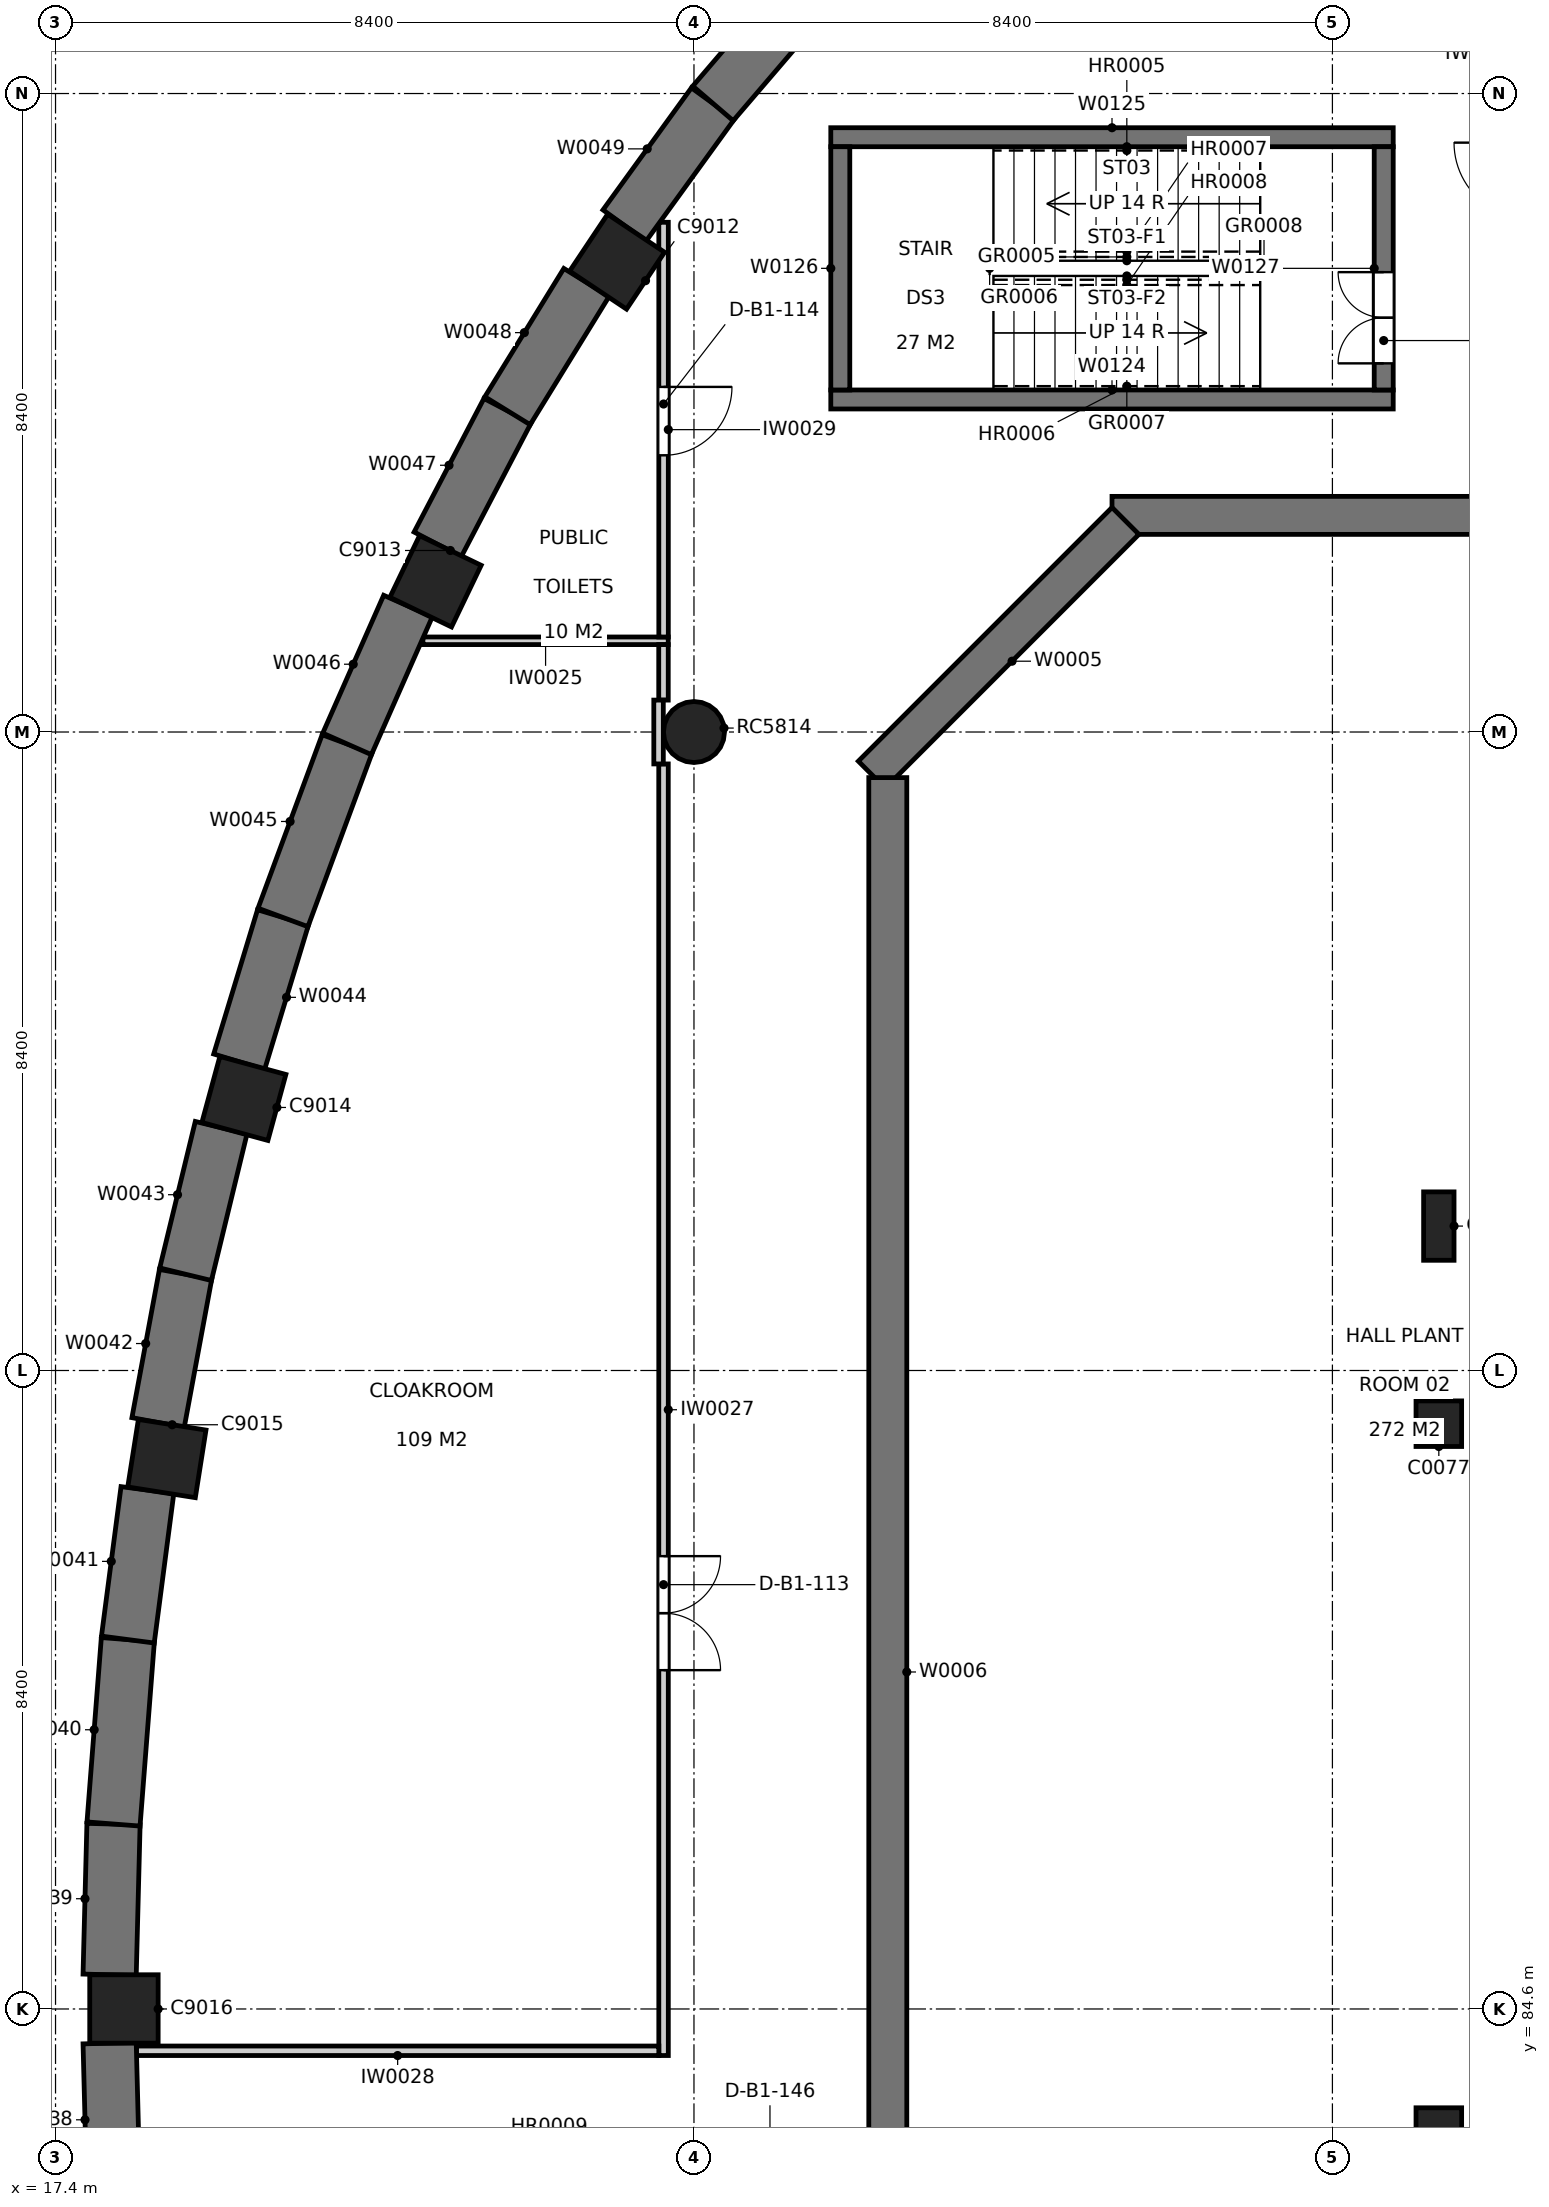
"""IFC4 building model, lengths in metres.
Left out: names, types, materials, properties, quantities, classifications, styles, units other than length and angle.
Written with IfcOpenShell. Run it as: python <this file> out.ifc"""

import sys

from ifc_helpers import new_model, si_unit, direction, frame, frame_2d, origin, origin_2d, place, context, subcontext, project, spatial, rectangle, circle, extrude, element, fill, save


model = new_model("IFC4")
c1 = context("Model", 3, precision=1e-05, world=origin(), true_north=direction((0.0, 1.0)))
c2 = subcontext(c1, "Body", "Model", "MODEL_VIEW")
j1 = project(units=[si_unit("LENGTHUNIT", "METRE"), si_unit("PLANEANGLEUNIT", "RADIAN")], contexts=[c1])
p1 = place(None, origin())
s1 = spatial("IfcSite", under=j1, at=p1, CompositionType="ELEMENT")
p2 = place(p1, origin())
s2 = spatial("IfcBuilding", under=s1, at=p2, CompositionType="ELEMENT")
p3 = place(p2, frame((0.0, 0.0, -5.0)))
s3 = spatial("IfcBuildingStorey", under=s2, at=p3, CompositionType="ELEMENT", Elevation=-5.0)
for number, where, z_axis, x_axis in (
    (1, (24.788, 107.588, -0.5), (0.0, 0.0, 1.0), (0.555, 0.832, 0.0)),
    (2, (22.4, 103.383, -0.5), (0.0, 0.0, 1.0), (0.433, 0.901, 0.0)),
    (3, (19.878, 96.579, -0.5), (0.0, 0.0, 1.0), (0.263, 0.965, 0.0)),
    (4, (18.865, 91.842, -0.5), (0.0, 0.0, 1.0), (0.156, 0.988, 0.0)),
    (5, (18.3, 84.6, -0.5), (0.0, 0.0, 1.0), (2.07e-06, 1.0, 0.0)),
):
    element("IfcColumn", number, at=place(p3, frame(where, z_axis=z_axis, x_axis=x_axis)), inside=s3, PredefinedType="COLUMN", context=c2, shape_type="SweptSolid", body=[
        extrude(rectangle(XDim=0.9, YDim=0.9, at=origin_2d()), origin(), (0.0, 0.0, 1.0), 5.5),
    ])
p4 = place(p3, frame((25.8, 101.4, -0.5), z_axis=(0.0, 0.0, 1.0), x_axis=(1.0, 0.0, 0.0)))
e6 = element("IfcColumn", 6, at=p4, inside=s3, PredefinedType="COLUMN", context=c2, shape_type="SweptSolid", body=[
    extrude(circle(Radius=0.4, at=origin_2d()), origin(), (0.0, 0.0, 1.0), 5.5),
])
for number, where, z_axis, x_axis in (
    (7, (35.6, 83.0, -0.5), (0.0, 0.0, 1.0), (1.0, 0.0, 0.0)),
    (8, (35.6, 92.3, -0.5), (0.0, 0.0, 1.0), (1.0, 0.0, 0.0)),
):
    element("IfcColumn", number, at=place(p3, frame(where, z_axis=z_axis, x_axis=x_axis)), inside=s3, PredefinedType="COLUMN", context=c2, shape_type="SweptSolid", body=[
        extrude(rectangle(XDim=0.6, YDim=0.6, at=origin_2d()), origin(), (0.0, 0.0, 1.0), 5.5),
    ])
p5 = place(p3, frame((35.6, 94.9, -0.5), z_axis=(0.0, 0.0, 1.0), x_axis=(1.0, 0.0, 0.0)))
e9 = element("IfcColumn", 9, at=p5, inside=s3, PredefinedType="COLUMN", context=c2, shape_type="SweptSolid", body=[
    extrude(rectangle(XDim=0.4, YDim=0.9, at=origin_2d()), origin(), (0.0, 0.0, 1.0), 5.5),
])
p6 = place(p3, frame((53.9, 104.25, 0.0), z_axis=(0.0, 0.0, 1.0), x_axis=(-1.0, 0.0, 0.0)))
e10 = element("IfcWall", 10, at=p6, inside=s3, PredefinedType="SOLIDWALL", context=c2, shape_type="SweptSolid", body=[
    extrude(rectangle(XDim=22.6, YDim=0.5, at=frame_2d((11.3, 0.0))), origin(), (0.0, 0.0, 1.0), 5.0),
])
p7 = place(p6, frame((10.15, 0.0, 0.0)))
e11 = element("IfcOpeningElement", 11, at=p7, cuts=e10, PredefinedType="OPENING", context=c2, shape_type="SweptSolid", body=[
    extrude(rectangle(XDim=1.0, YDim=2.1, at=frame_2d((0.5, 1.05))), frame((0.0, 0.26, 0.0), z_axis=(0.0, -1.0, 0.0), x_axis=(1.0, 0.0, 0.0)), (0.0, 0.0, 1.0), 0.52),
])
p8 = place(p3, frame((31.477, 104.177, 0.0), z_axis=(0.0, 0.0, 1.0), x_axis=(-0.707106781187, -0.707106781187, 0.0)))
e12 = element("IfcWall", 12, at=p8, inside=s3, PredefinedType="SOLIDWALL", context=c2, shape_type="SweptSolid", body=[
    extrude(rectangle(XDim=4.72, YDim=0.5, at=frame_2d((2.36, 0.0))), origin(), (0.0, 0.0, 1.0), 5.0),
])
p9 = place(p3, frame((28.35, 100.8, 0.0), z_axis=(0.0, 0.0, 1.0), x_axis=(0.0, -1.0, 0.0)))
e13 = element("IfcWall", 13, at=p9, inside=s3, PredefinedType="SOLIDWALL", context=c2, shape_type="SweptSolid", body=[
    extrude(rectangle(XDim=38.151, YDim=0.5, at=frame_2d((19.076, 0.0))), origin(), (0.0, 0.0, 1.0), 5.0),
])
p10 = place(p3, frame((18.164, 82.152, 0.0), z_axis=(0.0, 0.0, 1.0), x_axis=(-0.025895516476, 0.999664654885, 0.0)))
e14 = element("IfcWall", 14, at=p10, inside=s3, PredefinedType="SOLIDWALL", context=c2, shape_type="SweptSolid", body=[
    extrude(rectangle(XDim=1.999, YDim=0.7, at=frame_2d((1.0, 0.0))), origin(), (0.0, 0.0, 1.0), 5.0),
])
p11 = place(p3, frame((18.112, 85.05, 0.0), z_axis=(0.0, 0.0, 1.0), x_axis=(0.025724062798, 0.999669081543, 0.0)))
e15 = element("IfcWall", 15, at=p11, inside=s3, PredefinedType="SOLIDWALL", context=c2, shape_type="SweptSolid", body=[
    extrude(rectangle(XDim=1.984, YDim=0.7, at=frame_2d((0.992, 0.0))), origin(), (0.0, 0.0, 1.0), 5.0),
])
p12 = place(p3, frame((18.163, 87.033, 0.0), z_axis=(0.0, 0.0, 1.0), x_axis=(0.077555774931, 0.99698801486, 0.0)))
e16 = element("IfcWall", 16, at=p12, inside=s3, PredefinedType="SOLIDWALL", context=c2, shape_type="SweptSolid", body=[
    extrude(rectangle(XDim=2.433, YDim=0.7, at=frame_2d((1.217, 0.0))), origin(), (0.0, 0.0, 1.0), 5.0),
])
p13 = place(p3, frame((18.352, 89.46, 0.0), z_axis=(0.0, 0.0, 1.0), x_axis=(0.129728552842, 0.991549546204, 0.0)))
e17 = element("IfcWall", 17, at=p13, inside=s3, PredefinedType="SOLIDWALL", context=c2, shape_type="SweptSolid", body=[
    extrude(rectangle(XDim=1.984, YDim=0.7, at=frame_2d((0.992, 0.0))), origin(), (0.0, 0.0, 1.0), 5.0),
])
for number, where, z_axis, x_axis in (
    (18, (18.749, 92.316, 0.0), (0.0, 0.0, 1.0), (0.182, 0.983, 0.0)),
    (19, (19.111, 94.266, 0.0), (0.0, 0.0, 1.0), (0.236, 0.972, 0.0)),
):
    element("IfcWall", number, at=place(p3, frame(where, z_axis=z_axis, x_axis=x_axis)), inside=s3, PredefinedType="SOLIDWALL", context=c2, shape_type="SweptSolid", body=[
        extrude(rectangle(XDim=1.983, YDim=0.7, at=frame_2d((0.992, 0.0))), origin(), (0.0, 0.0, 1.0), 5.0),
    ])
p14 = place(p3, frame((19.816, 97.062, 0.0), z_axis=(0.0, 0.0, 1.0), x_axis=(0.29059832342, 0.956845136072, 0.0)))
e20 = element("IfcWall", 20, at=p14, inside=s3, PredefinedType="SOLIDWALL", context=c2, shape_type="SweptSolid", body=[
    extrude(rectangle(XDim=1.984, YDim=0.7, at=frame_2d((0.992, 0.0))), origin(), (0.0, 0.0, 1.0), 5.0),
])
p15 = place(p3, frame((20.393, 98.96, 0.0), z_axis=(0.0, 0.0, 1.0), x_axis=(0.346644383813, 0.937996626417, 0.0)))
e21 = element("IfcWall", 21, at=p15, inside=s3, PredefinedType="SOLIDWALL", context=c2, shape_type="SweptSolid", body=[
    extrude(rectangle(XDim=2.433, YDim=0.7, at=frame_2d((1.217, 0.0))), origin(), (0.0, 0.0, 1.0), 5.0),
])
for number, where, z_axis, x_axis in (
    (22, (21.236, 101.243, 0.0), (0.0, 0.0, 1.0), (0.404, 0.915, 0.0)),
    (23, (22.428, 103.868, 0.0), (0.0, 0.0, 1.0), (0.463, 0.886, 0.0)),
):
    element("IfcWall", number, at=place(p3, frame(where, z_axis=z_axis, x_axis=x_axis)), inside=s3, PredefinedType="SOLIDWALL", context=c2, shape_type="SweptSolid", body=[
        extrude(rectangle(XDim=1.983, YDim=0.7, at=frame_2d((0.992, 0.0))), origin(), (0.0, 0.0, 1.0), 5.0),
    ])
p16 = place(p3, frame((23.347, 105.626, 0.0), z_axis=(0.0, 0.0, 1.0), x_axis=(0.52413177267, 0.851637179131, 0.0)))
e24 = element("IfcWall", 24, at=p16, inside=s3, PredefinedType="SOLIDWALL", context=c2, shape_type="SweptSolid", body=[
    extrude(rectangle(XDim=1.983, YDim=0.7, at=frame_2d((0.991, 0.0))), origin(), (0.0, 0.0, 1.0), 5.0),
])
p17 = place(p3, frame((24.886, 108.063, 0.0), z_axis=(0.0, 0.0, 1.0), x_axis=(0.586721433945, 0.809788836024, 0.0)))
e25 = element("IfcWall", 25, at=p17, inside=s3, PredefinedType="SOLIDWALL", context=c2, shape_type="SweptSolid", body=[
    extrude(rectangle(XDim=1.983, YDim=0.7, at=frame_2d((0.992, 0.0))), origin(), (0.0, 0.0, 1.0), 5.0),
])
p18 = place(p3, frame((26.05, 109.67, 0.0), z_axis=(0.0, 0.0, 1.0), x_axis=(0.650510330903, 0.759497405781, 0.0)))
e26 = element("IfcWall", 26, at=p18, inside=s3, PredefinedType="SOLIDWALL", context=c2, shape_type="SweptSolid", body=[
    extrude(rectangle(XDim=2.433, YDim=0.7, at=frame_2d((1.216, 0.0))), origin(), (0.0, 0.0, 1.0), 5.0),
])
for number, where, z_axis, x_axis in (
    (27, (27.6, 105.775, 0.0), (0.0, 0.0, 1.0), (1.0, 0.0, 0.0)),
    (28, (27.6, 109.225, 0.0), (0.0, 0.0, 1.0), (1.0, 0.0, 0.0)),
):
    element("IfcWall", number, at=place(p3, frame(where, z_axis=z_axis, x_axis=x_axis)), inside=s3, PredefinedType="SOLIDWALL", context=c2, shape_type="SweptSolid", body=[
        extrude(rectangle(XDim=7.4, YDim=0.25, at=frame_2d((3.7, 0.0))), origin(), (0.0, 0.0, 1.0), 5.0),
    ])
p19 = place(p3, frame((27.725, 105.9, 0.0), z_axis=(0.0, 0.0, 1.0), x_axis=(0.0, 1.0, 0.0)))
e29 = element("IfcWall", 29, at=p19, inside=s3, PredefinedType="SOLIDWALL", context=c2, shape_type="SweptSolid", body=[
    extrude(rectangle(XDim=3.2, YDim=0.25, at=frame_2d((1.6, 0.0))), origin(), (0.0, 0.0, 1.0), 5.0),
])
p20 = place(p3, frame((34.875, 105.9, 0.0), z_axis=(0.0, 0.0, 1.0), x_axis=(0.0, 1.0, 0.0)))
e30 = element("IfcWall", 30, at=p20, inside=s3, PredefinedType="SOLIDWALL", context=c2, shape_type="SweptSolid", body=[
    extrude(rectangle(XDim=3.2, YDim=0.25, at=frame_2d((1.6, 0.0))), origin(), (0.0, 0.0, 1.0), 5.0),
])
p21 = place(p20, frame((0.35, 0.0, 0.0)))
e31 = element("IfcOpeningElement", 31, at=p21, cuts=e30, PredefinedType="OPENING", context=c2, shape_type="SweptSolid", body=[
    extrude(rectangle(XDim=1.2, YDim=2.1, at=frame_2d((0.6, 1.05))), frame((0.0, 0.135, 0.0), z_axis=(0.0, -1.0, 0.0), x_axis=(1.0, 0.0, 0.0)), (0.0, 0.0, 1.0), 0.27),
])
p22 = place(p3, frame((22.234, 102.6, 0.0), z_axis=(0.0, 0.0, 1.0), x_axis=(1.0, 0.0, 0.0)))
e32 = element("IfcWall", 32, at=p22, inside=s3, PredefinedType="PARTITIONING", context=c2, shape_type="SweptSolid", body=[
    extrude(rectangle(XDim=3.228, YDim=0.1, at=frame_2d((1.614, 0.0))), origin(), (0.0, 0.0, 1.0), 4.75),
])
p23 = place(p3, frame((25.399, 102.55, 0.0), z_axis=(0.0, 0.0, 1.0), x_axis=(0.0, -1.0, 0.0)))
e33 = element("IfcWall", 33, at=p23, inside=s3, PredefinedType="PARTITIONING", context=c2, shape_type="SweptSolid", body=[
    extrude(rectangle(XDim=0.73, YDim=0.125, at=frame_2d((0.365, 0.0))), origin(), (0.0, 0.0, 1.0), 4.75),
])
p24 = place(p3, frame((25.399, 100.98, 0.0), z_axis=(0.0, 0.0, 1.0), x_axis=(4.3102829e-05, -0.999999999071, 0.0)))
e34 = element("IfcWall", 34, at=p24, inside=s3, PredefinedType="PARTITIONING", context=c2, shape_type="SweptSolid", body=[
    extrude(rectangle(XDim=16.992, YDim=0.125, at=frame_2d((8.496, 0.0))), origin(), (0.0, 0.0, 1.0), 3.8),
])
p25 = place(p24, frame((10.422, 0.0, 0.0)))
e35 = element("IfcOpeningElement", 35, at=p25, cuts=e34, PredefinedType="OPENING", context=c2, shape_type="SweptSolid", body=[
    extrude(rectangle(XDim=1.5, YDim=2.1, at=frame_2d((0.75, 1.05))), frame((0.0, 0.073, 0.0), z_axis=(0.0, -1.0, 0.0), x_axis=(1.0, 0.0, 0.0)), (0.0, 0.0, 1.0), 0.145),
])
p26 = place(p3, frame((25.337, 84.05, 0.0), z_axis=(0.0, 0.0, 1.0), x_axis=(-1.0, 0.0, 0.0)))
e36 = element("IfcWall", 36, at=p26, inside=s3, PredefinedType="PARTITIONING", context=c2, shape_type="SweptSolid", body=[
    extrude(rectangle(XDim=6.872, YDim=0.125, at=frame_2d((3.436, 0.0))), origin(), (0.0, 0.0, 1.0), 4.75),
])
p27 = place(p3, frame((25.4, 108.106, 0.0), z_axis=(0.0, 0.0, 1.0), x_axis=(0.0, -1.0, 0.0)))
e37 = element("IfcWall", 37, at=p27, inside=s3, PredefinedType="PARTITIONING", context=c2, shape_type="SweptSolid", body=[
    extrude(rectangle(XDim=5.456, YDim=0.125, at=frame_2d((2.728, 0.0))), origin(), (0.0, 0.0, 1.0), 4.1),
])
p28 = place(p27, frame((2.166, 0.0, 0.0)))
e38 = element("IfcOpeningElement", 38, at=p28, cuts=e37, PredefinedType="OPENING", context=c2, shape_type="SweptSolid", body=[
    extrude(rectangle(XDim=0.9, YDim=2.1, at=frame_2d((0.45, 1.05))), frame((0.0, 0.073, 0.0), z_axis=(0.0, -1.0, 0.0), x_axis=(1.0, 0.0, 0.0)), (0.0, 0.0, 1.0), 0.145),
])
p29 = place(p3, frame((25.334, 101.82, 0.0), z_axis=(0.0, 0.0, 1.0), x_axis=(0.000290697662, -0.999999957747, 0.0)))
e39 = element("IfcWall", 39, at=p29, inside=s3, PredefinedType="PARTITIONING", context=c2, shape_type="SweptSolid", body=[
    extrude(rectangle(XDim=0.84, YDim=0.125, at=frame_2d((0.42, 0.0))), origin(), (0.0, 0.0, 1.0), 3.8),
])
p30 = place(p25, origin())
e40 = element("IfcDoor", 40, at=p30, inside=s3, OperationType="DOUBLE_DOOR_SINGLE_SWING", PredefinedType="DOOR", context=c2, shape_type="SweptSolid", body=[
    extrude(rectangle(XDim=1.5, YDim=2.1, at=frame_2d((0.75, 1.05))), frame((0.0, 0.025, 0.0), z_axis=(0.0, -1.0, 0.0), x_axis=(1.0, 0.0, 0.0)), (0.0, 0.0, 1.0), 0.05),
])
fill(e35, e40)
p31 = place(p28, origin())
e41 = element("IfcDoor", 41, at=p31, inside=s3, OperationType="SINGLE_SWING_LEFT", PredefinedType="DOOR", context=c2, shape_type="SweptSolid", body=[
    extrude(rectangle(XDim=0.9, YDim=2.1, at=frame_2d((0.45, 1.05))), frame((0.0, 0.025, 0.0), z_axis=(0.0, -1.0, 0.0), x_axis=(1.0, 0.0, 0.0)), (0.0, 0.0, 1.0), 0.05),
])
fill(e38, e41)
p32 = place(p21, origin())
e42 = element("IfcDoor", 42, at=p32, inside=s3, OperationType="DOUBLE_DOOR_SINGLE_SWING", PredefinedType="DOOR", context=c2, shape_type="SweptSolid", body=[
    extrude(rectangle(XDim=1.2, YDim=2.1, at=frame_2d((0.6, 1.05))), frame((0.0, 0.025, 0.0), z_axis=(0.0, -1.0, 0.0), x_axis=(1.0, 0.0, 0.0)), (0.0, 0.0, 1.0), 0.05),
])
fill(e31, e42)
save(model, sys.argv[1])
